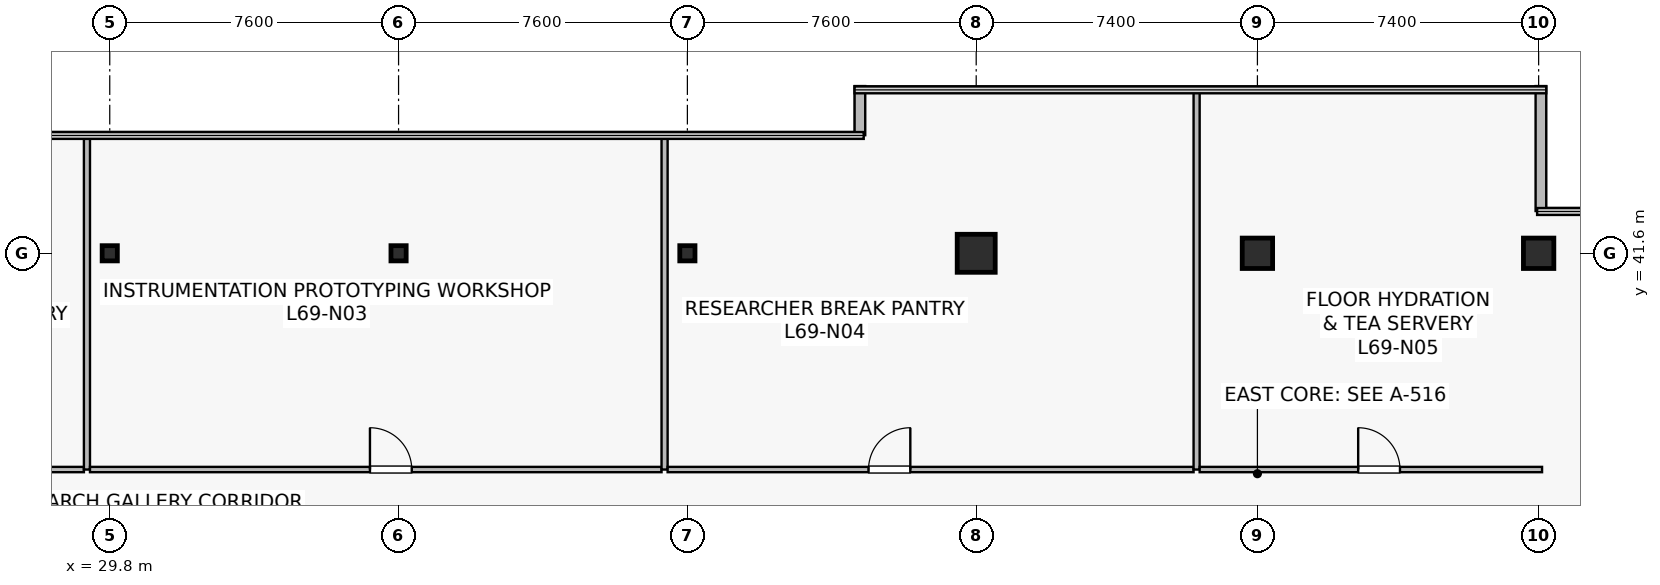
"""IFC4 building model, lengths in metres.
Left out: names, types, materials, properties, quantities, classifications, styles, units other than length and angle.
Written with IfcOpenShell. Run it as: python <this file> out.ifc"""

import sys

from ifc_helpers import new_model, si_unit, direction, frame, frame_2d, origin, origin_2d, place, context, subcontext, project, spatial, rectangle, hollow_rectangle, extrude, source, transform, mapped, element, fill, save


model = new_model("IFC4")
c1 = context("Model", 3, precision=1e-05, world=origin(), true_north=direction((0.0, 1.0)))
c2 = subcontext(c1, "Body", "Model", "MODEL_VIEW")
j1 = project(units=[si_unit("LENGTHUNIT", "METRE"), si_unit("PLANEANGLEUNIT", "RADIAN")], contexts=[c1])
p1 = place(None, origin())
s1 = spatial("IfcSite", under=j1, at=p1, CompositionType="ELEMENT")
p2 = place(p1, origin())
s2 = spatial("IfcBuilding", under=s1, at=p2, CompositionType="ELEMENT")
p3 = place(p2, frame((0.0, 0.0, 287.5)))
s3 = spatial("IfcBuildingStorey", under=s2, at=p3, CompositionType="ELEMENT", Elevation=287.5)
m1 = source(origin(), c2, "Body", "SweptSolid", [
    extrude(rectangle(XDim=1.0, YDim=1.0, at=origin_2d()), origin(), (0.0, 0.0, 1.0), 4.1),
])
p4 = place(p3, frame((52.6, 41.6, 0.0), z_axis=(0.0, 0.0, 1.0), x_axis=(1.0, 0.0, 0.0)))
e1 = element("IfcColumn", 1, at=p4, inside=s3, PredefinedType="COLUMN", context=c2, shape_type="MappedRepresentation", body=[
    mapped(m1, transform((0.0, 0.0, 0.0), scale=1.0)),
])
m2 = source(origin(), c2, "Body", "SweptSolid", [
    extrude(rectangle(XDim=0.8, YDim=0.8, at=origin_2d()), origin(), (0.0, 0.0, 1.0), 4.1),
])
for number, where, z_axis, x_axis in (
    (2, (60.0, 41.6, 0.0), (0.0, 0.0, 1.0), (1.0, 0.0, 0.0)),
    (3, (67.4, 41.6, 0.0), (0.0, 0.0, 1.0), (1.0, 0.0, 0.0)),
):
    element("IfcColumn", number, at=place(p3, frame(where, z_axis=z_axis, x_axis=x_axis)), inside=s3, PredefinedType="COLUMN", context=c2, shape_type="MappedRepresentation", body=[
        mapped(m2, transform((0.0, 0.0, 0.0), scale=1.0)),
    ])
m3 = source(origin(), c2, "Body", "SweptSolid", [
    extrude(hollow_rectangle(XDim=0.4, YDim=0.4, WallThickness=0.019, at=origin_2d()), origin(), (0.0, 0.0, 1.0), 4.1),
])
for number, where, z_axis, x_axis in (
    (4, (29.8, 41.6, 0.0), (0.0, 0.0, 1.0), (1.0, 0.0, 0.0)),
    (5, (37.4, 41.6, 0.0), (0.0, 0.0, 1.0), (1.0, 0.0, 0.0)),
    (6, (45.0, 41.6, 0.0), (0.0, 0.0, 1.0), (1.0, 0.0, 0.0)),
):
    element("IfcColumn", number, at=place(p3, frame(where, z_axis=z_axis, x_axis=x_axis)), inside=s3, PredefinedType="COLUMN", context=c2, shape_type="MappedRepresentation", body=[
        mapped(m3, transform((0.0, 0.0, 0.0), scale=1.0)),
    ])
p5 = place(p3, frame((67.46, 42.712, 0.0), z_axis=(0.0, 0.0, 1.0), x_axis=(0.0, 1.0, 0.0)))
e7 = element("IfcWall", 7, at=p5, inside=s3, PredefinedType="STANDARD", context=c2, shape_type="SweptSolid", body=[
    extrude(rectangle(XDim=3.288, YDim=0.28, at=frame_2d((1.644, 0.0))), origin(), (0.0, 0.0, 1.0), 3.8),
])
p6 = place(p3, frame((49.54, 46.0, 0.0), z_axis=(0.0, 0.0, 1.0), x_axis=(0.0, -1.0, 0.0)))
e8 = element("IfcWall", 8, at=p6, inside=s3, PredefinedType="STANDARD", context=c2, shape_type="SweptSolid", body=[
    extrude(rectangle(XDim=1.293, YDim=0.28, at=frame_2d((0.646, 0.0))), origin(), (0.0, 0.0, 1.0), 3.8),
])
p7 = place(p3, frame((15.68, 35.91, 0.0), z_axis=(0.0, 0.0, 1.0), x_axis=(1.0, 0.0, 0.0)))
e9 = element("IfcWall", 9, at=p7, inside=s3, PredefinedType="PARTITIONING", context=c2, shape_type="SweptSolid", body=[
    extrude(rectangle(XDim=13.44, YDim=0.14, at=frame_2d((6.72, 0.0))), origin(), (0.0, 0.0, 1.0), 3.197),
])
p8 = place(p7, frame((5.122, 0.0, 0.0)))
e10 = element("IfcOpeningElement", 10, at=p8, cuts=e9, PredefinedType="OPENING", context=c2, shape_type="SweptSolid", body=[
    extrude(rectangle(XDim=1.1, YDim=2.18, at=frame_2d((0.55, 1.09))), frame((0.0, 0.08, 0.0), z_axis=(0.0, -1.0, 0.0), x_axis=(1.0, 0.0, 0.0)), (0.0, 0.0, 1.0), 0.16),
])
p9 = place(p3, frame((29.2, 35.91, 0.0), z_axis=(0.0, 0.0, 1.0), x_axis=(0.0, 1.0, 0.0)))
e11 = element("IfcWall", 11, at=p9, inside=s3, PredefinedType="PARTITIONING", context=c2, shape_type="SweptSolid", body=[
    extrude(rectangle(XDim=8.78, YDim=0.16, at=frame_2d((4.39, 0.0))), origin(), (0.0, 0.0, 1.0), 3.135),
])
p10 = place(p3, frame((29.28, 35.91, 0.0), z_axis=(0.0, 0.0, 1.0), x_axis=(1.0, 0.0, 0.0)))
e12 = element("IfcWall", 12, at=p10, inside=s3, PredefinedType="PARTITIONING", context=c2, shape_type="SweptSolid", body=[
    extrude(rectangle(XDim=15.04, YDim=0.14, at=frame_2d((7.52, 0.0))), origin(), (0.0, 0.0, 1.0), 3.197),
])
p11 = place(p10, frame((7.367, 0.0, 0.0)))
e13 = element("IfcOpeningElement", 13, at=p11, cuts=e12, PredefinedType="OPENING", context=c2, shape_type="SweptSolid", body=[
    extrude(rectangle(XDim=1.1, YDim=2.18, at=frame_2d((0.55, 1.09))), frame((0.0, 0.08, 0.0), z_axis=(0.0, -1.0, 0.0), x_axis=(1.0, 0.0, 0.0)), (0.0, 0.0, 1.0), 0.16),
])
p12 = place(p3, frame((44.4, 35.91, 0.0), z_axis=(0.0, 0.0, 1.0), x_axis=(0.0, 1.0, 0.0)))
e14 = element("IfcWall", 14, at=p12, inside=s3, PredefinedType="PARTITIONING", context=c2, shape_type="SweptSolid", body=[
    extrude(rectangle(XDim=8.78, YDim=0.16, at=frame_2d((4.39, 0.0))), origin(), (0.0, 0.0, 1.0), 3.135),
])
p13 = place(p3, frame((44.48, 35.91, 0.0), z_axis=(0.0, 0.0, 1.0), x_axis=(1.0, 0.0, 0.0)))
e15 = element("IfcWall", 15, at=p13, inside=s3, PredefinedType="PARTITIONING", context=c2, shape_type="SweptSolid", body=[
    extrude(rectangle(XDim=13.84, YDim=0.14, at=frame_2d((6.92, 0.0))), origin(), (0.0, 0.0, 1.0), 3.197),
])
p14 = place(p13, frame((5.286, 0.0, 0.0)))
e16 = element("IfcOpeningElement", 16, at=p14, cuts=e15, PredefinedType="OPENING", context=c2, shape_type="SweptSolid", body=[
    extrude(rectangle(XDim=1.1, YDim=2.18, at=frame_2d((0.55, 1.09))), frame((0.0, 0.08, 0.0), z_axis=(0.0, -1.0, 0.0), x_axis=(1.0, 0.0, 0.0)), (0.0, 0.0, 1.0), 0.16),
])
p15 = place(p3, frame((58.4, 35.91, 0.0), z_axis=(0.0, 0.0, 1.0), x_axis=(0.0, 1.0, 0.0)))
e17 = element("IfcWall", 17, at=p15, inside=s3, PredefinedType="PARTITIONING", context=c2, shape_type="SweptSolid", body=[
    extrude(rectangle(XDim=9.98, YDim=0.16, at=frame_2d((4.99, 0.0))), origin(), (0.0, 0.0, 1.0), 3.135),
])
p16 = place(p3, frame((58.48, 35.91, 0.0), z_axis=(0.0, 0.0, 1.0), x_axis=(1.0, 0.0, 0.0)))
e18 = element("IfcWall", 18, at=p16, inside=s3, PredefinedType="PARTITIONING", context=c2, shape_type="SweptSolid", body=[
    extrude(rectangle(XDim=9.01, YDim=0.14, at=frame_2d((4.505, 0.0))), origin(), (0.0, 0.0, 1.0), 3.197),
])
p17 = place(p16, frame((4.171, 0.0, 0.0)))
e19 = element("IfcOpeningElement", 19, at=p17, cuts=e18, PredefinedType="OPENING", context=c2, shape_type="SweptSolid", body=[
    extrude(rectangle(XDim=1.1, YDim=2.18, at=frame_2d((0.55, 1.09))), frame((0.0, 0.08, 0.0), z_axis=(0.0, -1.0, 0.0), x_axis=(1.0, 0.0, 0.0)), (0.0, 0.0, 1.0), 0.16),
])
m4 = source(origin(), c2, "Body", "SweptSolid", [
    extrude(rectangle(XDim=1.1, YDim=2.18, at=frame_2d((0.55, 1.09))), frame((0.0, 0.025, 0.0), z_axis=(0.0, -1.0, 0.0), x_axis=(1.0, 0.0, 0.0)), (0.0, 0.0, 1.0), 0.05),
])
p18 = place(p11, origin())
e20 = element("IfcDoor", 20, at=p18, inside=s3, OperationType="SINGLE_SWING_LEFT", PredefinedType="DOOR", context=c2, shape_type="MappedRepresentation", body=[
    mapped(m4, transform((0.0, 0.0, 0.0), scale=1.0)),
])
fill(e13, e20)
p19 = place(p14, origin())
e21 = element("IfcDoor", 21, at=p19, inside=s3, OperationType="SINGLE_SWING_RIGHT", PredefinedType="DOOR", context=c2, shape_type="MappedRepresentation", body=[
    mapped(m4, transform((0.0, 0.0, 0.0), scale=1.0)),
])
fill(e16, e21)
p20 = place(p17, origin())
e22 = element("IfcDoor", 22, at=p20, inside=s3, OperationType="SINGLE_SWING_LEFT", PredefinedType="DOOR", context=c2, shape_type="MappedRepresentation", body=[
    mapped(m4, transform((0.0, 0.0, 0.0), scale=1.0)),
])
fill(e19, e22)
save(model, sys.argv[1])
